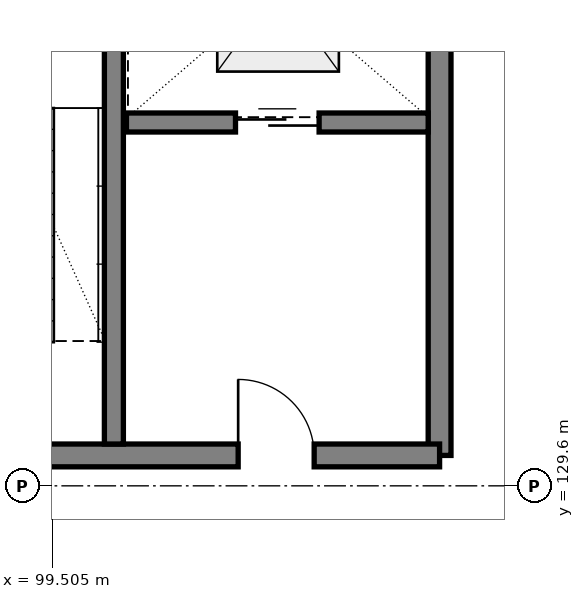
"""IFC4 building model, lengths in metres.
Left out: names, types, materials, properties, quantities, classifications, styles, units other than length and angle.
Written with IfcOpenShell. Run it as: python <this file> out.ifc"""

import sys

from ifc_helpers import new_model, si_unit, direction, frame, frame_2d, origin, place, context, subcontext, project, spatial, rectangle, extrude, element, fill, save


model = new_model("IFC4")
c1 = context("Model", 3, precision=1e-05, world=origin(), true_north=direction((0.0, 1.0)))
c2 = subcontext(c1, "Body", "Model", "MODEL_VIEW")
j1 = project(units=[si_unit("LENGTHUNIT", "METRE"), si_unit("PLANEANGLEUNIT", "RADIAN")], contexts=[c1])
p1 = place(None, origin())
s1 = spatial("IfcSite", under=j1, at=p1, CompositionType="ELEMENT")
p2 = place(p1, origin())
s2 = spatial("IfcBuilding", under=s1, at=p2, CompositionType="ELEMENT")
p3 = place(p2, origin())
s3 = spatial("IfcBuildingStorey", under=s2, at=p3, CompositionType="ELEMENT", Elevation=0.0)
p4 = place(p3, frame((104.6, 130.0, 0.0), z_axis=(0.0, 0.0, 1.0), x_axis=(0.0, 1.0, 0.0)))
e1 = element("IfcWall", 1, at=p4, inside=s3, PredefinedType="SHEAR", context=c2, shape_type="SweptSolid", body=[
    extrude(rectangle(XDim=8.0, YDim=0.3, at=frame_2d((4.0, 0.0), x_axis=(1.0, 0.0))), origin(), (0.0, 0.0, 1.0), 4.5),
])
p5 = place(p3, frame((97.2, 130.0, 0.0), z_axis=(0.0, 0.0, 1.0), x_axis=(1.0, 0.0, 0.0)))
e2 = element("IfcWall", 2, at=p5, inside=s3, PredefinedType="SHEAR", context=c2, shape_type="SweptSolid", body=[
    extrude(rectangle(XDim=7.4, YDim=0.3, at=frame_2d((3.7, 0.0), x_axis=(1.0, 0.0))), origin(), (0.0, 0.0, 1.0), 4.5),
])
p6 = place(p5, frame((1.1, 0.0, 0.0)))
e3 = element("IfcOpeningElement", 3, at=p6, cuts=e2, PredefinedType="OPENING", context=c2, shape_type="SweptSolid", body=[
    extrude(rectangle(XDim=1.0, YDim=2.15, at=frame_2d((0.5, 1.075), x_axis=(1.0, 0.0))), frame((0.0, 0.16, 0.0), z_axis=(0.0, -1.0, 0.0), x_axis=(1.0, 0.0, 0.0)), (0.0, 0.0, 1.0), 0.32),
])
p7 = place(p5, frame((4.75, 0.0, 0.0)))
e4 = element("IfcOpeningElement", 4, at=p7, cuts=e2, PredefinedType="OPENING", context=c2, shape_type="SweptSolid", body=[
    extrude(rectangle(XDim=1.0, YDim=2.15, at=frame_2d((0.5, 1.075), x_axis=(1.0, 0.0))), frame((0.0, 0.16, 0.0), z_axis=(0.0, -1.0, 0.0), x_axis=(1.0, 0.0, 0.0)), (0.0, 0.0, 1.0), 0.32),
])
p8 = place(p3, frame((100.315, 130.15, 0.0), z_axis=(0.0, 0.0, 1.0), x_axis=(0.0, 1.0, 0.0)))
e5 = element("IfcWall", 5, at=p8, inside=s3, PredefinedType="SHEAR", context=c2, shape_type="SweptSolid", body=[
    extrude(rectangle(XDim=7.7, YDim=0.25, at=frame_2d((3.85, 0.0), x_axis=(1.0, 0.0))), origin(), (0.0, 0.0, 1.0), 4.5),
])
p9 = place(p3, frame((100.48, 134.38, 0.0), z_axis=(0.0, 0.0, 1.0), x_axis=(1.0, 0.0, 0.0)))
e6 = element("IfcWall", 6, at=p9, inside=s3, PredefinedType="SHEAR", context=c2, shape_type="SweptSolid", body=[
    extrude(rectangle(XDim=3.97, YDim=0.25, at=frame_2d((1.985, 0.0), x_axis=(1.0, 0.0))), origin(), (0.0, 0.0, 1.0), 4.24),
])
p10 = place(p9, frame((1.435, 0.0, 0.0)))
e7 = element("IfcOpeningElement", 7, at=p10, cuts=e6, PredefinedType="OPENING", context=c2, shape_type="SweptSolid", body=[
    extrude(rectangle(XDim=1.1, YDim=2.15, at=frame_2d((0.55, 1.075), x_axis=(1.0, 0.0))), frame((0.0, 0.135, 0.0), z_axis=(0.0, -1.0, 0.0), x_axis=(1.0, 0.0, 0.0)), (0.0, 0.0, 1.0), 0.27),
])
p11 = place(p7, origin())
e8 = element("IfcDoor", 8, at=p11, inside=s3, OperationType="SINGLE_SWING_LEFT", PredefinedType="DOOR", context=c2, shape_type="SweptSolid", body=[
    extrude(rectangle(XDim=1.0, YDim=2.15, at=frame_2d((0.5, 1.075), x_axis=(1.0, 0.0))), frame((0.0, 0.025, 0.0), z_axis=(0.0, -1.0, 0.0), x_axis=(1.0, 0.0, 0.0)), (0.0, 0.0, 1.0), 0.05),
])
fill(e4, e8)
p12 = place(p10, origin())
e9 = element("IfcDoor", 9, at=p12, inside=s3, OperationType="SLIDING_TO_LEFT", PredefinedType="DOOR", context=c2, shape_type="SweptSolid", body=[
    extrude(rectangle(XDim=1.1, YDim=2.15, at=frame_2d((0.55, 1.075), x_axis=(1.0, 0.0))), frame((0.0, 0.025, 0.0), z_axis=(0.0, -1.0, 0.0), x_axis=(1.0, 0.0, 0.0)), (0.0, 0.0, 1.0), 0.05),
])
fill(e7, e9)
save(model, sys.argv[1])
